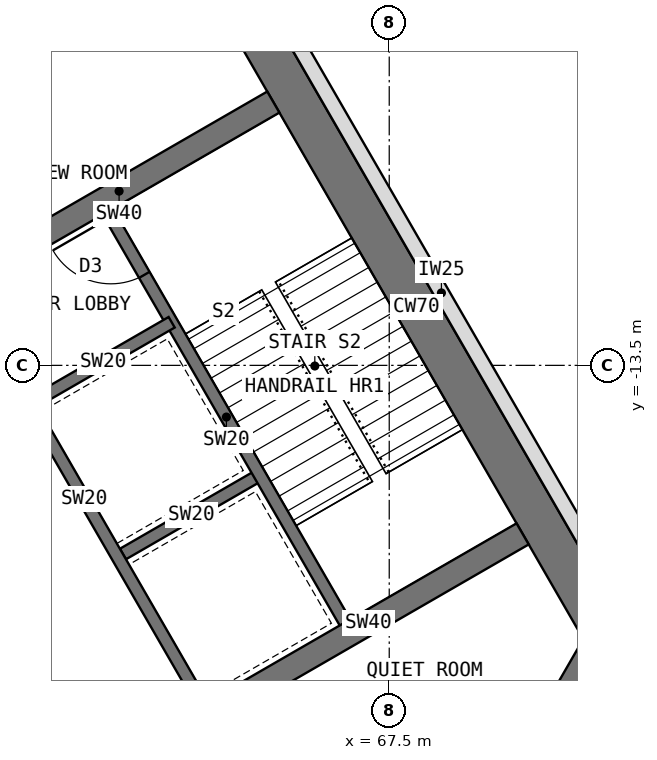
"""IFC4 building model, lengths in metres.
Left out: names, types, materials, properties, quantities, classifications, styles, units other than length and angle.
Written with IfcOpenShell. Run it as: python <this file> out.ifc"""

import sys

from ifc_helpers import new_model, si_unit, direction, frame, frame_2d, origin, place, context, subcontext, project, spatial, rectangle, extrude, element, fill, save


model = new_model("IFC4")
c1 = context("Model", 3, precision=1e-05, world=origin(), true_north=direction((0.0, 1.0)))
c2 = subcontext(c1, "Body", "Model", "MODEL_VIEW")
j1 = project(units=[si_unit("LENGTHUNIT", "METRE"), si_unit("PLANEANGLEUNIT", "RADIAN")], contexts=[c1])
p1 = place(None, origin())
s1 = spatial("IfcSite", under=j1, at=p1, CompositionType="ELEMENT")
p2 = place(p1, origin())
s2 = spatial("IfcBuilding", under=s1, at=p2, CompositionType="ELEMENT")
p3 = place(p2, frame((0.0, 0.0, 15.5)))
s3 = spatial("IfcBuildingStorey", under=s2, at=p3, CompositionType="ELEMENT", Elevation=15.5)
p4 = place(p3, frame((68.822, -21.939, 0.0), z_axis=(0.0, 0.0, 1.0), x_axis=(0.500024481964, 0.866011268655, 0.0)))
e1 = element("IfcWall", 1, at=p4, inside=s3, PredefinedType="SHEAR", context=c2, shape_type="SweptSolid", body=[
    extrude(rectangle(XDim=4.548, YDim=0.7, at=frame_2d((2.274, 0.0))), origin(), (0.0, 0.0, 1.0), 5.0),
])
p5 = place(p3, frame((71.096, -18.0, 0.0), z_axis=(0.0, 0.0, 1.0), x_axis=(-0.500005998175, 0.866021940709, 0.0)))
e2 = element("IfcWall", 2, at=p5, inside=s3, PredefinedType="SHEAR", context=c2, shape_type="SweptSolid", body=[
    extrude(rectangle(XDim=12.596, YDim=0.7, at=frame_2d((6.298, 0.0))), origin(), (0.0, 0.0, 1.0), 5.0),
])
p6 = place(p3, frame((64.484, -19.164, 0.0), z_axis=(0.0, 0.0, 1.0), x_axis=(-0.49999894854, 0.866026010844, 0.0)))
e3 = element("IfcWall", 3, at=p6, inside=s3, PredefinedType="SHEAR", context=c2, shape_type="SweptSolid", body=[
    extrude(rectangle(XDim=8.0, YDim=0.2, at=frame_2d((4.0, 0.0))), origin(), (0.0, 0.0, 1.0), 5.0),
])
p7 = place(p6, frame((6.3, 0.0, 0.0)))
e4 = element("IfcOpeningElement", 4, at=p7, cuts=e3, PredefinedType="OPENING", context=c2, shape_type="SweptSolid", body=[
    extrude(rectangle(XDim=1.2, YDim=2.1, at=frame_2d((0.6, 1.05))), frame((0.0, 0.11, 0.0), z_axis=(0.0, -1.0, 0.0), x_axis=(1.0, 0.0, 0.0)), (0.0, 0.0, 1.0), 0.22),
])
p8 = place(p3, frame((63.12, -16.603, 0.0), z_axis=(0.0, 0.0, 1.0), x_axis=(0.866062058628, 0.499936506574, 0.0)))
e5 = element("IfcWall", 5, at=p8, inside=s3, PredefinedType="SHEAR", context=c2, shape_type="SweptSolid", body=[
    extrude(rectangle(XDim=2.6, YDim=0.2, at=frame_2d((1.3, 0.0))), origin(), (0.0, 0.0, 1.0), 5.0),
])
p9 = place(p3, frame((61.67, -14.091, 0.0), z_axis=(0.0, 0.0, 1.0), x_axis=(0.86603858612, 0.49997716683, 0.0)))
e6 = element("IfcWall", 6, at=p9, inside=s3, PredefinedType="SHEAR", context=c2, shape_type="SweptSolid", body=[
    extrude(rectangle(XDim=2.6, YDim=0.2, at=frame_2d((1.3, 0.0))), origin(), (0.0, 0.0, 1.0), 5.0),
])
p10 = place(p3, frame((66.822, -17.814, 0.0), z_axis=(0.0, 0.0, 1.0), x_axis=(-0.49999894854, 0.866026010844, 0.0)))
e7 = element("IfcWall", 7, at=p10, inside=s3, PredefinedType="SHEAR", context=c2, shape_type="SweptSolid", body=[
    extrude(rectangle(XDim=8.0, YDim=0.2, at=frame_2d((4.0, 0.0))), origin(), (0.0, 0.0, 1.0), 5.0),
])
p11 = place(p10, frame((6.7, 0.0, 0.0)))
e8 = element("IfcOpeningElement", 8, at=p11, cuts=e7, PredefinedType="OPENING", context=c2, shape_type="SweptSolid", body=[
    extrude(rectangle(XDim=1.1, YDim=2.1, at=frame_2d((0.55, 1.05))), frame((0.0, 0.11, 0.0), z_axis=(0.0, -1.0, 0.0), x_axis=(1.0, 0.0, 0.0)), (0.0, 0.0, 1.0), 0.22),
])
for number, where, z_axis, x_axis in (
    (9, (60.52, -12.099, 0.0), (0.0, 0.0, 1.0), (0.866, 0.5, 0.0)),
    (10, (64.62, -19.201, 0.0), (0.0, 0.0, 1.0), (0.866, 0.5, 0.0)),
):
    element("IfcWall", number, at=place(p3, frame(where, z_axis=z_axis, x_axis=x_axis)), inside=s3, PredefinedType="SHEAR", context=c2, shape_type="SweptSolid", body=[
        extrude(rectangle(XDim=5.858, YDim=0.4, at=frame_2d((2.929, 0.0))), origin(), (0.0, 0.0, 1.0), 5.0),
    ])
p12 = place(p3, frame((65.375, -7.141, 0.0), z_axis=(0.0, 0.0, 1.0), x_axis=(0.499996365031, -0.866027502425, 0.0)))
e11 = element("IfcWall", 11, at=p12, inside=s3, PredefinedType="STANDARD", context=c2, shape_type="SweptSolid", body=[
    extrude(rectangle(XDim=11.933, YDim=0.25, at=frame_2d((5.967, 0.0))), origin(), (0.0, 0.0, 1.0), 4.65),
])
p13 = place(p11, origin())
e12 = element("IfcDoor", 12, at=p13, inside=s3, OperationType="SINGLE_SWING_RIGHT", PredefinedType="DOOR", context=c2, shape_type="SweptSolid", body=[
    extrude(rectangle(XDim=1.1, YDim=2.1, at=frame_2d((0.55, 1.05))), frame((0.0, 0.025, 0.0), z_axis=(0.0, -1.0, 0.0), x_axis=(1.0, 0.0, 0.0)), (0.0, 0.0, 1.0), 0.05),
])
fill(e8, e12)
save(model, sys.argv[1])
